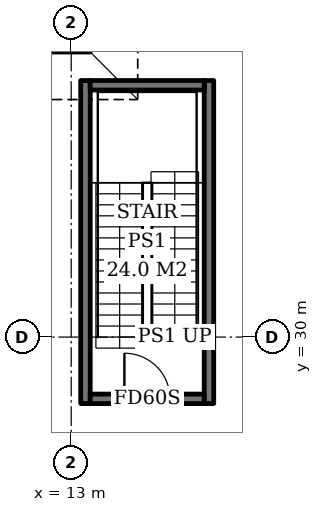
"""IFC4 building model, lengths in metres.
Left out: names, types, materials, properties, quantities, classifications, styles, units other than length and angle.
Written with IfcOpenShell. Run it as: python <this file> out.ifc"""

import sys

from ifc_helpers import new_model, si_unit, direction, frame, frame_2d, origin, place, context, subcontext, project, spatial, rectangle, extrude, element, fill, save


model = new_model("IFC4")
c1 = context("Model", 3, precision=1e-05, world=origin(), true_north=direction((0.0, 1.0)))
c2 = subcontext(c1, "Body", "Model", "MODEL_VIEW")
j1 = project(units=[si_unit("LENGTHUNIT", "METRE"), si_unit("PLANEANGLEUNIT", "RADIAN")], contexts=[c1])
p1 = place(None, origin())
s1 = spatial("IfcSite", under=j1, at=p1, CompositionType="ELEMENT")
p2 = place(p1, origin())
s2 = spatial("IfcBuilding", under=s1, at=p2, CompositionType="ELEMENT")
p3 = place(p2, frame((0.0, 0.0, -10.0)))
s3 = spatial("IfcBuildingStorey", under=s2, at=p3, CompositionType="ELEMENT", Elevation=-10.0)
for number, where, z_axis, x_axis in (
    (1, (13.375, 28.25, 0.0), (0.0, 0.0, 1.0), (0.0, 1.0, 0.0)),
    (2, (16.625, 28.25, 0.0), (0.0, 0.0, 1.0), (0.0, 1.0, 0.0)),
):
    element("IfcWall", number, at=place(p3, frame(where, z_axis=z_axis, x_axis=x_axis)), inside=s3, PredefinedType="SOLIDWALL", context=c2, shape_type="SweptSolid", body=[
        extrude(rectangle(XDim=8.5, YDim=0.25, at=frame_2d((4.25, 0.0))), origin(), (0.0, 0.0, 1.0), 4.7),
    ])
p4 = place(p3, frame((13.5, 28.375, 0.0), z_axis=(0.0, 0.0, 1.0), x_axis=(1.0, 0.0, 0.0)))
e3 = element("IfcWall", 3, at=p4, inside=s3, PredefinedType="SOLIDWALL", context=c2, shape_type="SweptSolid", body=[
    extrude(rectangle(XDim=3.0, YDim=0.25, at=frame_2d((1.5, 0.0))), origin(), (0.0, 0.0, 1.0), 4.7),
])
p5 = place(p4, frame((0.9, 0.0, 0.0)))
e4 = element("IfcOpeningElement", 4, at=p5, cuts=e3, PredefinedType="OPENING", context=c2, shape_type="SweptSolid", body=[
    extrude(rectangle(XDim=1.2, YDim=2.1, at=frame_2d((0.6, 1.05))), frame((0.0, 0.135, 0.0), z_axis=(0.0, -1.0, 0.0), x_axis=(1.0, 0.0, 0.0)), (0.0, 0.0, 1.0), 0.27),
])
p6 = place(p3, frame((13.5, 36.625, 0.0), z_axis=(0.0, 0.0, 1.0), x_axis=(1.0, 0.0, 0.0)))
e5 = element("IfcWall", 5, at=p6, inside=s3, PredefinedType="SOLIDWALL", context=c2, shape_type="SweptSolid", body=[
    extrude(rectangle(XDim=3.0, YDim=0.25, at=frame_2d((1.5, 0.0))), origin(), (0.0, 0.0, 1.0), 4.7),
])
p7 = place(p5, origin())
e6 = element("IfcDoor", 6, at=p7, inside=s3, OperationType="SINGLE_SWING_LEFT", PredefinedType="DOOR", context=c2, shape_type="SweptSolid", body=[
    extrude(rectangle(XDim=1.2, YDim=2.1, at=frame_2d((0.6, 1.05))), frame((0.0, 0.025, 0.0), z_axis=(0.0, -1.0, 0.0), x_axis=(1.0, 0.0, 0.0)), (0.0, 0.0, 1.0), 0.05),
])
fill(e4, e6)
save(model, sys.argv[1])
